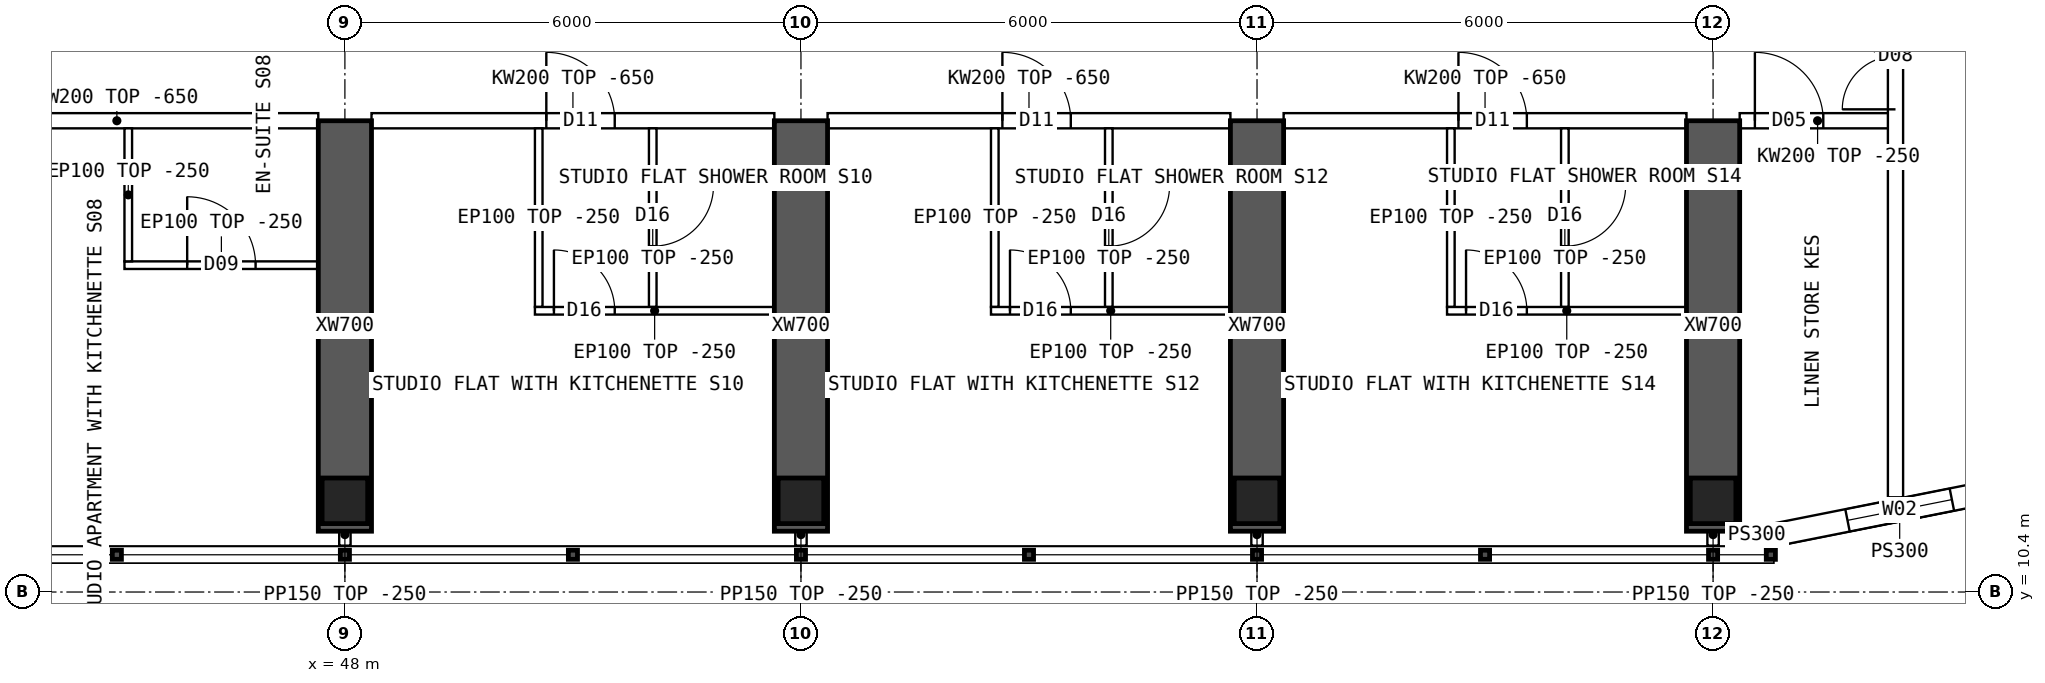
"""IFC4 building model, lengths in metres.
Left out: names, types, materials, properties, quantities, classifications, styles, units other than length and angle.
Written with IfcOpenShell. Run it as: python <this file> out.ifc"""

import sys

from ifc_helpers import new_model, si_unit, direction, frame, frame_2d, origin, origin_2d, place, context, subcontext, project, spatial, polyline, rectangle, hollow_rectangle, outline, extrude, element, fill, save


model = new_model("IFC4")
c1 = context("Model", 3, precision=1e-05, world=origin(), true_north=direction((0.0, 1.0)))
c2 = subcontext(c1, "Body", "Model", "MODEL_VIEW")
j1 = project(units=[si_unit("LENGTHUNIT", "METRE"), si_unit("PLANEANGLEUNIT", "RADIAN")], contexts=[c1])
p1 = place(None, origin())
s1 = spatial("IfcSite", under=j1, at=p1, CompositionType="ELEMENT")
p2 = place(p1, origin())
s2 = spatial("IfcBuilding", under=s1, at=p2, CompositionType="ELEMENT")
p3 = place(p2, frame((0.0, 0.0, 246.55)))
s3 = spatial("IfcBuildingStorey", under=s2, at=p3, CompositionType="ELEMENT", Elevation=246.55)
for number, where, z_axis, x_axis in (
    (1, (48.0, 11.6, 0.0), (0.0, 0.0, 1.0), (1.0, 0.0, 0.0)),
    (2, (54.0, 11.6, 0.0), (0.0, 0.0, 1.0), (1.0, 0.0, 0.0)),
    (3, (60.0, 11.6, 0.0), (0.0, 0.0, 1.0), (1.0, 0.0, 0.0)),
    (4, (66.0, 11.6, 0.0), (0.0, 0.0, 1.0), (1.0, 0.0, 0.0)),
):
    element("IfcColumn", number, at=place(p3, frame(where, z_axis=z_axis, x_axis=x_axis)), inside=s3, PredefinedType="COLUMN", context=c2, shape_type="SweptSolid", body=[
        extrude(hollow_rectangle(XDim=0.6, YDim=0.6, WallThickness=0.06, at=origin_2d()), origin(), (0.0, 0.0, 1.0), 3.75),
    ])
for number, where, z_axis, x_axis in (
    (5, (48.0, 11.2, 0.0), (0.0, 0.0, 1.0), (0.0, 1.0, 0.0)),
    (6, (54.0, 11.2, 0.0), (0.0, 0.0, 1.0), (0.0, 1.0, 0.0)),
    (7, (60.0, 11.2, 0.0), (0.0, 0.0, 1.0), (0.0, 1.0, 0.0)),
    (8, (66.0, 11.2, 0.0), (0.0, 0.0, 1.0), (0.0, 1.0, 0.0)),
):
    element("IfcWall", number, at=place(p3, frame(where, z_axis=z_axis, x_axis=x_axis)), inside=s3, PredefinedType="SHEAR", context=c2, shape_type="SweptSolid", body=[
        extrude(rectangle(XDim=5.4, YDim=0.7, at=frame_2d((2.7, 0.0))), origin(), (0.0, 0.0, 1.0), 3.75),
    ])
p4 = place(p3, frame((66.8, 11.15, 0.0), z_axis=(0.0, 0.0, 1.0), x_axis=(0.98078325777, 0.195100490205, 0.0)))
e9 = element("IfcWall", 9, at=p4, inside=s3, PredefinedType="SOLIDWALL", context=c2, shape_type="SweptSolid", body=[
    extrude(outline(polyline([(-0.03, -0.15), (3.405, -0.15), (3.345, 0.15), (0.03, 0.15), (-0.03, -0.15)])), origin(), (0.0, 0.0, 1.0), 3.5),
])
p5 = place(p4, frame((0.988, 0.0, 0.9)))
e10 = element("IfcOpeningElement", 10, at=p5, cuts=e9, PredefinedType="OPENING", context=c2, shape_type="SweptSolid", body=[
    extrude(rectangle(XDim=1.4, YDim=1.8, at=frame_2d((0.7, 0.9))), frame((0.0, 0.16, 0.0), z_axis=(0.0, -1.0, 0.0), x_axis=(1.0, 0.0, 0.0)), (0.0, 0.0, 1.0), 0.32),
])
p6 = place(p3, frame((66.8, 11.15, 0.0), z_axis=(0.0, 0.0, 1.0), x_axis=(-1.0, 0.0, 0.0)))
e11 = element("IfcWall", 11, at=p6, inside=s3, PredefinedType="SOLIDWALL", context=c2, shape_type="SweptSolid", body=[
    extrude(rectangle(XDim=0.45, YDim=0.3, at=frame_2d((0.225, 0.0))), origin(), (0.0, 0.0, 1.0), 3.5),
])
p7 = place(p3, frame((42.35, 16.6, 0.0), z_axis=(0.0, 0.0, 1.0), x_axis=(1.0, 0.0, 0.0)))
e12 = element("IfcWall", 12, at=p7, inside=s3, PredefinedType="SOLIDWALL", context=c2, shape_type="SweptSolid", body=[
    extrude(outline(polyline([(0.0, 0.0), (5.3, 0.0), (5.3, 3.1), (0.0, 3.1), (0.0, 0.0)])), frame((0.0, 0.1, 0.0), z_axis=(0.0, -1.0, 0.0), x_axis=(1.0, 0.0, 0.0)), (0.0, 0.0, 1.0), 0.2),
])
p8 = place(p7, frame((0.1, 0.0, 0.0)))
e13 = element("IfcOpeningElement", 13, at=p8, cuts=e12, PredefinedType="OPENING", context=c2, shape_type="SweptSolid", body=[
    extrude(rectangle(XDim=0.9, YDim=2.1, at=frame_2d((0.45, 1.05))), frame((0.0, 0.11, 0.0), z_axis=(0.0, -1.0, 0.0), x_axis=(1.0, 0.0, 0.0)), (0.0, 0.0, 1.0), 0.22),
])
p9 = place(p3, frame((48.35, 16.6, 0.0), z_axis=(0.0, 0.0, 1.0), x_axis=(1.0, 0.0, 0.0)))
e14 = element("IfcWall", 14, at=p9, inside=s3, PredefinedType="SOLIDWALL", context=c2, shape_type="SweptSolid", body=[
    extrude(outline(polyline([(0.0, 0.0), (5.3, 0.0), (5.3, 3.1), (0.0, 3.1), (0.0, 0.0)])), frame((0.0, 0.1, 0.0), z_axis=(0.0, -1.0, 0.0), x_axis=(1.0, 0.0, 0.0)), (0.0, 0.0, 1.0), 0.2),
])
p10 = place(p9, frame((2.3, 0.0, 0.0)))
e15 = element("IfcOpeningElement", 15, at=p10, cuts=e14, PredefinedType="OPENING", context=c2, shape_type="SweptSolid", body=[
    extrude(rectangle(XDim=0.9, YDim=2.1, at=frame_2d((0.45, 1.05))), frame((0.0, 0.11, 0.0), z_axis=(0.0, -1.0, 0.0), x_axis=(1.0, 0.0, 0.0)), (0.0, 0.0, 1.0), 0.22),
])
p11 = place(p3, frame((54.35, 16.6, 0.0), z_axis=(0.0, 0.0, 1.0), x_axis=(1.0, 0.0, 0.0)))
e16 = element("IfcWall", 16, at=p11, inside=s3, PredefinedType="SOLIDWALL", context=c2, shape_type="SweptSolid", body=[
    extrude(outline(polyline([(0.0, 0.0), (5.3, 0.0), (5.3, 3.1), (0.0, 3.1), (0.0, 0.0)])), frame((0.0, 0.1, 0.0), z_axis=(0.0, -1.0, 0.0), x_axis=(1.0, 0.0, 0.0)), (0.0, 0.0, 1.0), 0.2),
])
p12 = place(p11, frame((2.3, 0.0, 0.0)))
e17 = element("IfcOpeningElement", 17, at=p12, cuts=e16, PredefinedType="OPENING", context=c2, shape_type="SweptSolid", body=[
    extrude(rectangle(XDim=0.9, YDim=2.1, at=frame_2d((0.45, 1.05))), frame((0.0, 0.11, 0.0), z_axis=(0.0, -1.0, 0.0), x_axis=(1.0, 0.0, 0.0)), (0.0, 0.0, 1.0), 0.22),
])
p13 = place(p3, frame((60.35, 16.6, 0.0), z_axis=(0.0, 0.0, 1.0), x_axis=(1.0, 0.0, 0.0)))
e18 = element("IfcWall", 18, at=p13, inside=s3, PredefinedType="SOLIDWALL", context=c2, shape_type="SweptSolid", body=[
    extrude(outline(polyline([(0.0, 0.0), (5.3, 0.0), (5.3, 3.1), (0.0, 3.1), (0.0, 0.0)])), frame((0.0, 0.1, 0.0), z_axis=(0.0, -1.0, 0.0), x_axis=(1.0, 0.0, 0.0)), (0.0, 0.0, 1.0), 0.2),
])
p14 = place(p13, frame((2.3, 0.0, 0.0)))
e19 = element("IfcOpeningElement", 19, at=p14, cuts=e18, PredefinedType="OPENING", context=c2, shape_type="SweptSolid", body=[
    extrude(rectangle(XDim=0.9, YDim=2.1, at=frame_2d((0.45, 1.05))), frame((0.0, 0.11, 0.0), z_axis=(0.0, -1.0, 0.0), x_axis=(1.0, 0.0, 0.0)), (0.0, 0.0, 1.0), 0.22),
])
p15 = place(p3, frame((66.35, 16.6, 0.0), z_axis=(0.0, 0.0, 1.0), x_axis=(1.0, 0.0, 0.0)))
e20 = element("IfcWall", 20, at=p15, inside=s3, PredefinedType="SOLIDWALL", context=c2, shape_type="SweptSolid", body=[
    extrude(rectangle(XDim=2.05, YDim=0.2, at=frame_2d((1.025, 0.0))), origin(), (0.0, 0.0, 1.0), 3.5),
])
p16 = place(p15, frame((0.2, 0.0, 0.0)))
e21 = element("IfcOpeningElement", 21, at=p16, cuts=e20, PredefinedType="OPENING", context=c2, shape_type="SweptSolid", body=[
    extrude(rectangle(XDim=0.9, YDim=2.1, at=frame_2d((0.45, 1.05))), frame((0.0, 0.11, 0.0), z_axis=(0.0, -1.0, 0.0), x_axis=(1.0, 0.0, 0.0)), (0.0, 0.0, 1.0), 0.22),
])
p17 = place(p3, frame((47.65, 14.7, 0.0), z_axis=(0.0, 0.0, 1.0), x_axis=(-1.0, 0.0, 0.0)))
e22 = element("IfcWall", 22, at=p17, inside=s3, PredefinedType="PARTITIONING", context=c2, shape_type="SweptSolid", body=[
    extrude(rectangle(XDim=2.55, YDim=0.1, at=frame_2d((1.275, 0.0))), origin(), (0.0, 0.0, 1.0), 3.5),
])
p18 = place(p17, frame((0.825, 0.0, 0.0)))
e23 = element("IfcOpeningElement", 23, at=p18, cuts=e22, PredefinedType="OPENING", context=c2, shape_type="SweptSolid", body=[
    extrude(rectangle(XDim=0.9, YDim=2.1, at=frame_2d((0.45, 1.05))), frame((0.0, 0.06, 0.0), z_axis=(0.0, -1.0, 0.0), x_axis=(1.0, 0.0, 0.0)), (0.0, 0.0, 1.0), 0.12),
])
p19 = place(p3, frame((45.15, 14.75, 0.0), z_axis=(0.0, 0.0, 1.0), x_axis=(0.0, 1.0, 0.0)))
e24 = element("IfcWall", 24, at=p19, inside=s3, PredefinedType="PARTITIONING", context=c2, shape_type="SweptSolid", body=[
    extrude(outline(polyline([(0.0, 0.0), (1.75, 0.0), (1.75, 3.1), (1.702, 3.1), (1.7, 3.5), (0.0, 3.5), (0.0, 0.0)])), frame((0.0, 0.05, 0.0), z_axis=(0.0, -1.0, 0.0), x_axis=(1.0, 0.0, 0.0)), (0.0, 0.0, 1.0), 0.1),
])
p20 = place(p3, frame((53.65, 14.1, 0.0), z_axis=(0.0, 0.0, 1.0), x_axis=(-1.0, 0.0, 0.0)))
e25 = element("IfcWall", 25, at=p20, inside=s3, PredefinedType="PARTITIONING", context=c2, shape_type="SweptSolid", body=[
    extrude(rectangle(XDim=3.15, YDim=0.1, at=frame_2d((1.575, 0.0))), origin(), (0.0, 0.0, 1.0), 3.5),
])
p21 = place(p20, frame((2.1, 0.0, 0.0)))
e26 = element("IfcOpeningElement", 26, at=p21, cuts=e25, PredefinedType="OPENING", context=c2, shape_type="SweptSolid", body=[
    extrude(rectangle(XDim=0.8, YDim=2.1, at=frame_2d((0.4, 1.05))), frame((0.0, 0.06, 0.0), z_axis=(0.0, -1.0, 0.0), x_axis=(1.0, 0.0, 0.0)), (0.0, 0.0, 1.0), 0.12),
])
p22 = place(p3, frame((50.55, 14.15, 0.0), z_axis=(0.0, 0.0, 1.0), x_axis=(0.0, 1.0, 0.0)))
e27 = element("IfcWall", 27, at=p22, inside=s3, PredefinedType="PARTITIONING", context=c2, shape_type="SweptSolid", body=[
    extrude(outline(polyline([(0.0, 0.0), (2.35, 0.0), (2.35, 3.1), (2.302, 3.1), (2.3, 3.5), (0.0, 3.5), (0.0, 0.0)])), frame((0.0, 0.05, 0.0), z_axis=(0.0, -1.0, 0.0), x_axis=(1.0, 0.0, 0.0)), (0.0, 0.0, 1.0), 0.1),
])
p23 = place(p3, frame((52.05, 14.15, 0.0), z_axis=(0.0, 0.0, 1.0), x_axis=(0.0, 1.0, 0.0)))
e28 = element("IfcWall", 28, at=p23, inside=s3, PredefinedType="PARTITIONING", context=c2, shape_type="SweptSolid", body=[
    extrude(outline(polyline([(0.0, 0.0), (2.35, 0.0), (2.35, 3.1), (2.302, 3.1), (2.3, 3.5), (0.0, 3.5), (0.0, 0.0)])), frame((0.0, 0.05, 0.0), z_axis=(0.0, -1.0, 0.0), x_axis=(1.0, 0.0, 0.0)), (0.0, 0.0, 1.0), 0.1),
])
p24 = place(p23, frame((0.8, 0.0, 0.0)))
e29 = element("IfcOpeningElement", 29, at=p24, cuts=e28, PredefinedType="OPENING", context=c2, shape_type="SweptSolid", body=[
    extrude(rectangle(XDim=0.8, YDim=2.1, at=frame_2d((0.4, 1.05))), frame((0.0, 0.06, 0.0), z_axis=(0.0, -1.0, 0.0), x_axis=(1.0, 0.0, 0.0)), (0.0, 0.0, 1.0), 0.12),
])
p25 = place(p3, frame((59.65, 14.1, 0.0), z_axis=(0.0, 0.0, 1.0), x_axis=(-1.0, 0.0, 0.0)))
e30 = element("IfcWall", 30, at=p25, inside=s3, PredefinedType="PARTITIONING", context=c2, shape_type="SweptSolid", body=[
    extrude(rectangle(XDim=3.15, YDim=0.1, at=frame_2d((1.575, 0.0))), origin(), (0.0, 0.0, 1.0), 3.5),
])
p26 = place(p25, frame((2.1, 0.0, 0.0)))
e31 = element("IfcOpeningElement", 31, at=p26, cuts=e30, PredefinedType="OPENING", context=c2, shape_type="SweptSolid", body=[
    extrude(rectangle(XDim=0.8, YDim=2.1, at=frame_2d((0.4, 1.05))), frame((0.0, 0.06, 0.0), z_axis=(0.0, -1.0, 0.0), x_axis=(1.0, 0.0, 0.0)), (0.0, 0.0, 1.0), 0.12),
])
p27 = place(p3, frame((56.55, 14.15, 0.0), z_axis=(0.0, 0.0, 1.0), x_axis=(0.0, 1.0, 0.0)))
e32 = element("IfcWall", 32, at=p27, inside=s3, PredefinedType="PARTITIONING", context=c2, shape_type="SweptSolid", body=[
    extrude(outline(polyline([(0.0, 0.0), (2.35, 0.0), (2.35, 3.1), (2.302, 3.1), (2.3, 3.5), (0.0, 3.5), (0.0, 0.0)])), frame((0.0, 0.05, 0.0), z_axis=(0.0, -1.0, 0.0), x_axis=(1.0, 0.0, 0.0)), (0.0, 0.0, 1.0), 0.1),
])
p28 = place(p3, frame((58.05, 14.15, 0.0), z_axis=(0.0, 0.0, 1.0), x_axis=(0.0, 1.0, 0.0)))
e33 = element("IfcWall", 33, at=p28, inside=s3, PredefinedType="PARTITIONING", context=c2, shape_type="SweptSolid", body=[
    extrude(outline(polyline([(0.0, 0.0), (2.35, 0.0), (2.35, 3.1), (2.302, 3.1), (2.3, 3.5), (0.0, 3.5), (0.0, 0.0)])), frame((0.0, 0.05, 0.0), z_axis=(0.0, -1.0, 0.0), x_axis=(1.0, 0.0, 0.0)), (0.0, 0.0, 1.0), 0.1),
])
p29 = place(p28, frame((0.8, 0.0, 0.0)))
e34 = element("IfcOpeningElement", 34, at=p29, cuts=e33, PredefinedType="OPENING", context=c2, shape_type="SweptSolid", body=[
    extrude(rectangle(XDim=0.8, YDim=2.1, at=frame_2d((0.4, 1.05))), frame((0.0, 0.06, 0.0), z_axis=(0.0, -1.0, 0.0), x_axis=(1.0, 0.0, 0.0)), (0.0, 0.0, 1.0), 0.12),
])
p30 = place(p3, frame((65.65, 14.1, 0.0), z_axis=(0.0, 0.0, 1.0), x_axis=(-1.0, 0.0, 0.0)))
e35 = element("IfcWall", 35, at=p30, inside=s3, PredefinedType="PARTITIONING", context=c2, shape_type="SweptSolid", body=[
    extrude(rectangle(XDim=3.15, YDim=0.1, at=frame_2d((1.575, 0.0))), origin(), (0.0, 0.0, 1.0), 3.5),
])
p31 = place(p30, frame((2.1, 0.0, 0.0)))
e36 = element("IfcOpeningElement", 36, at=p31, cuts=e35, PredefinedType="OPENING", context=c2, shape_type="SweptSolid", body=[
    extrude(rectangle(XDim=0.8, YDim=2.1, at=frame_2d((0.4, 1.05))), frame((0.0, 0.06, 0.0), z_axis=(0.0, -1.0, 0.0), x_axis=(1.0, 0.0, 0.0)), (0.0, 0.0, 1.0), 0.12),
])
p32 = place(p3, frame((62.55, 14.15, 0.0), z_axis=(0.0, 0.0, 1.0), x_axis=(0.0, 1.0, 0.0)))
e37 = element("IfcWall", 37, at=p32, inside=s3, PredefinedType="PARTITIONING", context=c2, shape_type="SweptSolid", body=[
    extrude(outline(polyline([(0.0, 0.0), (2.35, 0.0), (2.35, 3.1), (2.302, 3.1), (2.3, 3.5), (0.0, 3.5), (0.0, 0.0)])), frame((0.0, 0.05, 0.0), z_axis=(0.0, -1.0, 0.0), x_axis=(1.0, 0.0, 0.0)), (0.0, 0.0, 1.0), 0.1),
])
p33 = place(p3, frame((64.05, 14.15, 0.0), z_axis=(0.0, 0.0, 1.0), x_axis=(0.0, 1.0, 0.0)))
e38 = element("IfcWall", 38, at=p33, inside=s3, PredefinedType="PARTITIONING", context=c2, shape_type="SweptSolid", body=[
    extrude(outline(polyline([(0.0, 0.0), (2.35, 0.0), (2.35, 3.1), (2.302, 3.1), (2.3, 3.5), (0.0, 3.5), (0.0, 0.0)])), frame((0.0, 0.05, 0.0), z_axis=(0.0, -1.0, 0.0), x_axis=(1.0, 0.0, 0.0)), (0.0, 0.0, 1.0), 0.1),
])
p34 = place(p33, frame((0.8, 0.0, 0.0)))
e39 = element("IfcOpeningElement", 39, at=p34, cuts=e38, PredefinedType="OPENING", context=c2, shape_type="SweptSolid", body=[
    extrude(rectangle(XDim=0.8, YDim=2.1, at=frame_2d((0.4, 1.05))), frame((0.0, 0.06, 0.0), z_axis=(0.0, -1.0, 0.0), x_axis=(1.0, 0.0, 0.0)), (0.0, 0.0, 1.0), 0.12),
])
p35 = place(p3, frame((68.4, 11.646, 0.0), z_axis=(0.0, 0.0, 1.0), x_axis=(0.0, 1.0, 0.0)))
e40 = element("IfcWall", 40, at=p35, inside=s3, PredefinedType="SOLIDWALL", context=c2, shape_type="SweptSolid", body=[
    extrude(rectangle(XDim=40.708, YDim=0.2, at=frame_2d((20.354, 0.0))), origin(), (0.0, 0.0, 1.0), 3.5),
])
p36 = place(p35, frame((5.104, 0.0, 0.0)))
e41 = element("IfcOpeningElement", 41, at=p36, cuts=e40, PredefinedType="OPENING", context=c2, shape_type="SweptSolid", body=[
    extrude(rectangle(XDim=1.4, YDim=2.1, at=frame_2d((0.7, 1.05))), frame((0.0, 0.11, 0.0), z_axis=(0.0, -1.0, 0.0), x_axis=(1.0, 0.0, 0.0)), (0.0, 0.0, 1.0), 0.22),
])
p37 = place(p35, frame((34.104, 0.0, 0.0)))
e42 = element("IfcOpeningElement", 42, at=p37, cuts=e40, PredefinedType="OPENING", context=c2, shape_type="SweptSolid", body=[
    extrude(rectangle(XDim=1.4, YDim=2.1, at=frame_2d((0.7, 1.05))), frame((0.0, 0.11, 0.0), z_axis=(0.0, -1.0, 0.0), x_axis=(1.0, 0.0, 0.0)), (0.0, 0.0, 1.0), 0.22),
])
for number, where, z_axis, x_axis in (
    (43, (48.0, 11.3, 0.0), (0.0, 0.0, 1.0), (0.0, -1.0, 0.0)),
    (44, (54.0, 11.3, 0.0), (0.0, 0.0, 1.0), (0.0, -1.0, 0.0)),
    (45, (60.0, 11.3, 0.0), (0.0, 0.0, 1.0), (0.0, -1.0, 0.0)),
    (46, (66.0, 11.3, 0.0), (0.0, 0.0, 1.0), (0.0, -1.0, 0.0)),
):
    element("IfcWall", number, at=place(p3, frame(where, z_axis=z_axis, x_axis=x_axis)), inside=s3, PredefinedType="PARTITIONING", context=c2, shape_type="SweptSolid", body=[
        extrude(rectangle(XDim=0.29, YDim=0.15, at=frame_2d((0.145, 0.0))), origin(), (0.0, 0.0, 1.0), 3.5),
    ])
p38 = place(p5, origin())
e47 = element("IfcWindow", 47, at=p38, inside=s3, PartitioningType="SINGLE_PANEL", PredefinedType="WINDOW", context=c2, shape_type="SweptSolid", body=[
    extrude(rectangle(XDim=1.4, YDim=1.8, at=frame_2d((0.7, 0.9))), frame((0.0, 0.03, 0.0), z_axis=(0.0, -1.0, 0.0), x_axis=(1.0, 0.0, 0.0)), (0.0, 0.0, 1.0), 0.06),
])
fill(e10, e47)
p39 = place(p18, origin())
e48 = element("IfcDoor", 48, at=p39, inside=s3, OperationType="SINGLE_SWING_RIGHT", PredefinedType="DOOR", context=c2, shape_type="SweptSolid", body=[
    extrude(rectangle(XDim=0.9, YDim=2.1, at=frame_2d((0.45, 1.05))), frame((0.0, 0.025, 0.0), z_axis=(0.0, -1.0, 0.0), x_axis=(1.0, 0.0, 0.0)), (0.0, 0.0, 1.0), 0.05),
])
fill(e23, e48)
p40 = place(p21, origin())
e49 = element("IfcDoor", 49, at=p40, inside=s3, OperationType="SINGLE_SWING_RIGHT", PredefinedType="DOOR", context=c2, shape_type="SweptSolid", body=[
    extrude(rectangle(XDim=0.8, YDim=2.1, at=frame_2d((0.4, 1.05))), frame((0.0, 0.025, 0.0), z_axis=(0.0, -1.0, 0.0), x_axis=(1.0, 0.0, 0.0)), (0.0, 0.0, 1.0), 0.05),
])
fill(e26, e49)
p41 = place(p24, origin())
e50 = element("IfcDoor", 50, at=p41, inside=s3, OperationType="SINGLE_SWING_RIGHT", PredefinedType="DOOR", context=c2, shape_type="SweptSolid", body=[
    extrude(rectangle(XDim=0.8, YDim=2.1, at=frame_2d((0.4, 1.05))), frame((0.0, 0.025, 0.0), z_axis=(0.0, -1.0, 0.0), x_axis=(1.0, 0.0, 0.0)), (0.0, 0.0, 1.0), 0.05),
])
fill(e29, e50)
p42 = place(p10, origin())
e51 = element("IfcDoor", 51, at=p42, inside=s3, OperationType="SINGLE_SWING_LEFT", PredefinedType="DOOR", context=c2, shape_type="SweptSolid", body=[
    extrude(rectangle(XDim=0.9, YDim=2.1, at=frame_2d((0.45, 1.05))), frame((0.0, 0.025, 0.0), z_axis=(0.0, -1.0, 0.0), x_axis=(1.0, 0.0, 0.0)), (0.0, 0.0, 1.0), 0.05),
])
fill(e15, e51)
p43 = place(p26, origin())
e52 = element("IfcDoor", 52, at=p43, inside=s3, OperationType="SINGLE_SWING_RIGHT", PredefinedType="DOOR", context=c2, shape_type="SweptSolid", body=[
    extrude(rectangle(XDim=0.8, YDim=2.1, at=frame_2d((0.4, 1.05))), frame((0.0, 0.025, 0.0), z_axis=(0.0, -1.0, 0.0), x_axis=(1.0, 0.0, 0.0)), (0.0, 0.0, 1.0), 0.05),
])
fill(e31, e52)
p44 = place(p29, origin())
e53 = element("IfcDoor", 53, at=p44, inside=s3, OperationType="SINGLE_SWING_RIGHT", PredefinedType="DOOR", context=c2, shape_type="SweptSolid", body=[
    extrude(rectangle(XDim=0.8, YDim=2.1, at=frame_2d((0.4, 1.05))), frame((0.0, 0.025, 0.0), z_axis=(0.0, -1.0, 0.0), x_axis=(1.0, 0.0, 0.0)), (0.0, 0.0, 1.0), 0.05),
])
fill(e34, e53)
p45 = place(p12, origin())
e54 = element("IfcDoor", 54, at=p45, inside=s3, OperationType="SINGLE_SWING_LEFT", PredefinedType="DOOR", context=c2, shape_type="SweptSolid", body=[
    extrude(rectangle(XDim=0.9, YDim=2.1, at=frame_2d((0.45, 1.05))), frame((0.0, 0.025, 0.0), z_axis=(0.0, -1.0, 0.0), x_axis=(1.0, 0.0, 0.0)), (0.0, 0.0, 1.0), 0.05),
])
fill(e17, e54)
p46 = place(p31, origin())
e55 = element("IfcDoor", 55, at=p46, inside=s3, OperationType="SINGLE_SWING_RIGHT", PredefinedType="DOOR", context=c2, shape_type="SweptSolid", body=[
    extrude(rectangle(XDim=0.8, YDim=2.1, at=frame_2d((0.4, 1.05))), frame((0.0, 0.025, 0.0), z_axis=(0.0, -1.0, 0.0), x_axis=(1.0, 0.0, 0.0)), (0.0, 0.0, 1.0), 0.05),
])
fill(e36, e55)
p47 = place(p34, origin())
e56 = element("IfcDoor", 56, at=p47, inside=s3, OperationType="SINGLE_SWING_RIGHT", PredefinedType="DOOR", context=c2, shape_type="SweptSolid", body=[
    extrude(rectangle(XDim=0.8, YDim=2.1, at=frame_2d((0.4, 1.05))), frame((0.0, 0.025, 0.0), z_axis=(0.0, -1.0, 0.0), x_axis=(1.0, 0.0, 0.0)), (0.0, 0.0, 1.0), 0.05),
])
fill(e39, e56)
p48 = place(p14, origin())
e57 = element("IfcDoor", 57, at=p48, inside=s3, OperationType="SINGLE_SWING_LEFT", PredefinedType="DOOR", context=c2, shape_type="SweptSolid", body=[
    extrude(rectangle(XDim=0.9, YDim=2.1, at=frame_2d((0.45, 1.05))), frame((0.0, 0.025, 0.0), z_axis=(0.0, -1.0, 0.0), x_axis=(1.0, 0.0, 0.0)), (0.0, 0.0, 1.0), 0.05),
])
fill(e19, e57)
p49 = place(p36, origin())
e58 = element("IfcDoor", 58, at=p49, inside=s3, OperationType="DOUBLE_DOOR_SINGLE_SWING", PredefinedType="DOOR", context=c2, shape_type="SweptSolid", body=[
    extrude(rectangle(XDim=1.4, YDim=2.1, at=frame_2d((0.7, 1.05))), frame((0.0, 0.025, 0.0), z_axis=(0.0, -1.0, 0.0), x_axis=(1.0, 0.0, 0.0)), (0.0, 0.0, 1.0), 0.05),
])
fill(e41, e58)
p50 = place(p16, origin())
e59 = element("IfcDoor", 59, at=p50, inside=s3, OperationType="SINGLE_SWING_LEFT", PredefinedType="DOOR", context=c2, shape_type="SweptSolid", body=[
    extrude(rectangle(XDim=0.9, YDim=2.1, at=frame_2d((0.45, 1.05))), frame((0.0, 0.025, 0.0), z_axis=(0.0, -1.0, 0.0), x_axis=(1.0, 0.0, 0.0)), (0.0, 0.0, 1.0), 0.05),
])
fill(e21, e59)
save(model, sys.argv[1])
